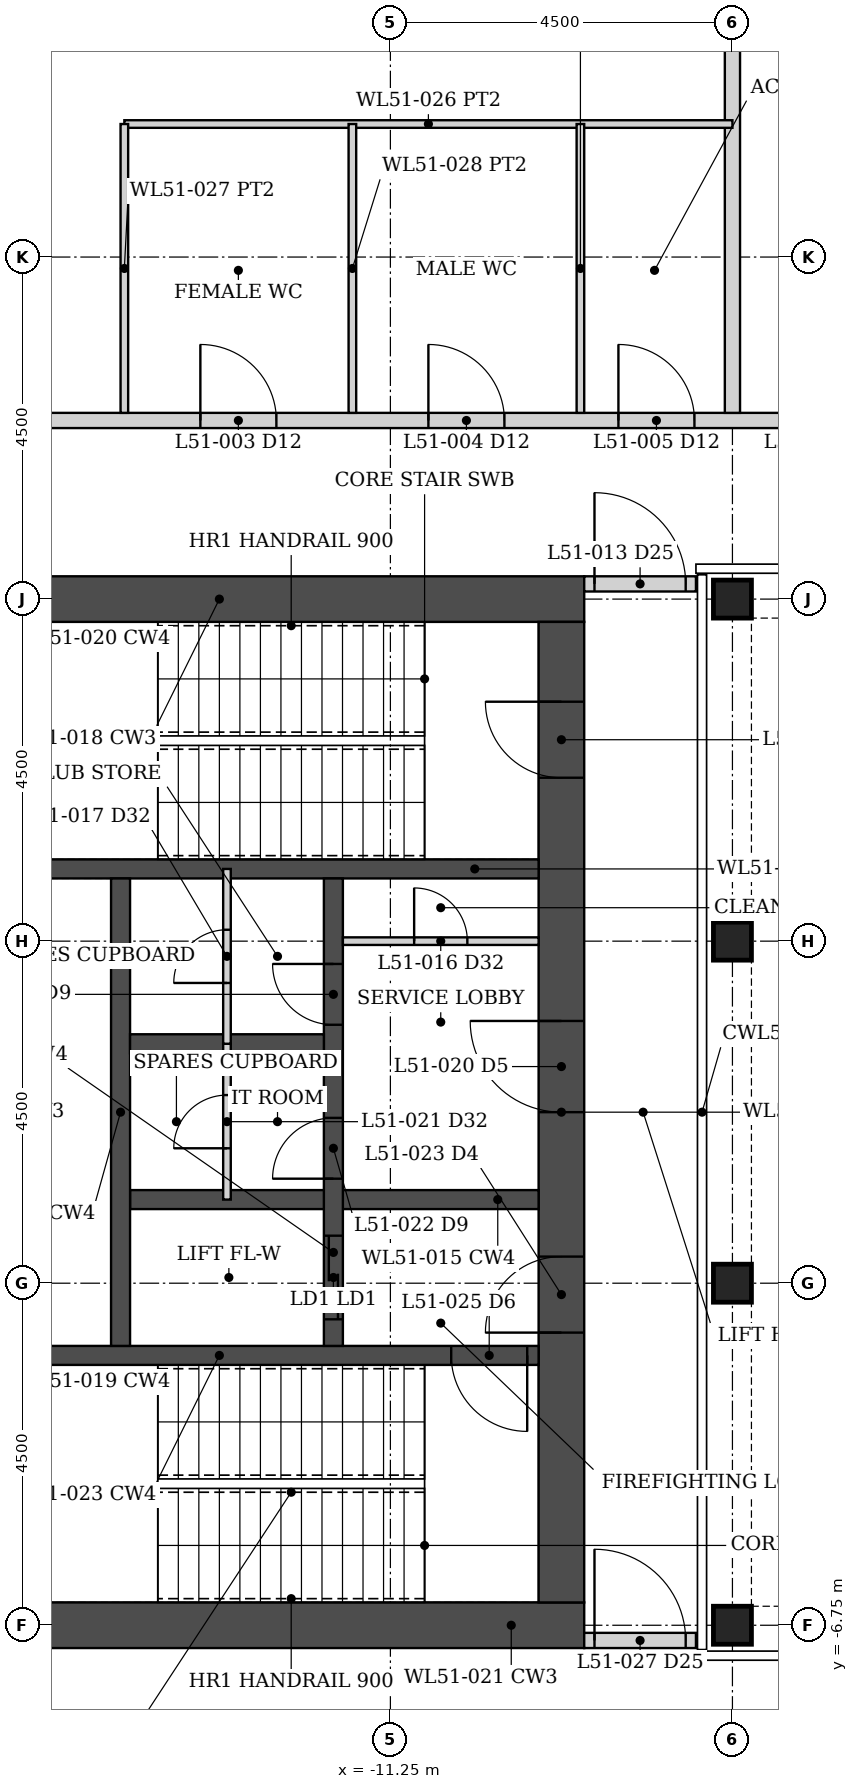
"""IFC4 building model, lengths in metres.
Left out: names, types, materials, properties, quantities, classifications, styles, units other than length and angle.
Written with IfcOpenShell. Run it as: python <this file> out.ifc"""

import sys

from ifc_helpers import new_model, si_unit, direction, frame, frame_2d, origin, origin_2d, place, context, subcontext, project, spatial, rectangle, hollow_rectangle, extrude, element, fill, save


model = new_model("IFC4")
c1 = context("Model", 3, precision=1e-05, world=origin(), true_north=direction((0.0, 1.0)))
c2 = subcontext(c1, "Body", "Model", "MODEL_VIEW")
j1 = project(units=[si_unit("LENGTHUNIT", "METRE"), si_unit("PLANEANGLEUNIT", "RADIAN")], contexts=[c1])
p1 = place(None, origin())
s1 = spatial("IfcSite", under=j1, at=p1, CompositionType="ELEMENT")
p2 = place(p1, origin())
s2 = spatial("IfcBuilding", under=s1, at=p2, CompositionType="ELEMENT")
p3 = place(p2, frame((0.0, 0.0, 195.8)))
s3 = spatial("IfcBuildingStorey", under=s2, at=p3, CompositionType="ELEMENT", Elevation=195.8)
for number, where, z_axis, x_axis in (
    (1, (-6.75, -6.75, 0.0), (0.0, 0.0, 1.0), (1.0, 0.0, 0.0)),
    (2, (-6.75, -2.25, 0.0), (0.0, 0.0, 1.0), (1.0, 0.0, 0.0)),
    (3, (-6.75, 2.25, 0.0), (0.0, 0.0, 1.0), (1.0, 0.0, 0.0)),
    (4, (-6.75, 6.75, 0.0), (0.0, 0.0, 1.0), (1.0, 0.0, 0.0)),
):
    element("IfcColumn", number, at=place(p3, frame(where, z_axis=z_axis, x_axis=x_axis)), inside=s3, PredefinedType="COLUMN", context=c2, shape_type="SweptSolid", body=[
        extrude(hollow_rectangle(XDim=0.5, YDim=0.5, WallThickness=0.03, at=origin_2d()), origin(), (0.0, 0.0, 1.0), 5.0),
    ])
for number, where, z_axis, x_axis in (
    (5, (-8.7, -6.75, 0.0), (0.0, 0.0, 1.0), (-1.0, 0.0, 0.0)),
    (6, (-8.7, 6.75, 0.0), (0.0, 0.0, 1.0), (-1.0, 0.0, 0.0)),
):
    element("IfcWall", number, at=place(p3, frame(where, z_axis=z_axis, x_axis=x_axis)), inside=s3, PredefinedType="SHEAR", context=c2, shape_type="SweptSolid", body=[
        extrude(rectangle(XDim=9.6, YDim=0.6, at=frame_2d((4.8, 0.0))), origin(), (0.0, 0.0, 1.0), 5.0),
    ])
p4 = place(p3, frame((-9.0, -6.45, 0.0), z_axis=(0.0, 0.0, 1.0), x_axis=(0.0, 1.0, 0.0)))
e7 = element("IfcWall", 7, at=p4, inside=s3, PredefinedType="SHEAR", context=c2, shape_type="SweptSolid", body=[
    extrude(rectangle(XDim=12.9, YDim=0.6, at=frame_2d((6.45, 0.0))), origin(), (0.0, 0.0, 1.0), 5.0),
])
p5 = place(p4, frame((3.55, 0.0, 0.0)))
e8 = element("IfcOpeningElement", 8, at=p5, cuts=e7, PredefinedType="OPENING", context=c2, shape_type="SweptSolid", body=[
    extrude(rectangle(XDim=1.0, YDim=2.1, at=frame_2d((0.5, 1.05))), frame((0.0, 0.31, 0.0), z_axis=(0.0, -1.0, 0.0), x_axis=(1.0, 0.0, 0.0)), (0.0, 0.0, 1.0), 0.62),
])
p6 = place(p4, frame((6.45, 0.0, 0.0)))
e9 = element("IfcOpeningElement", 9, at=p6, cuts=e7, PredefinedType="OPENING", context=c2, shape_type="SweptSolid", body=[
    extrude(rectangle(XDim=1.2, YDim=2.1, at=frame_2d((0.6, 1.05))), frame((0.0, 0.31, 0.0), z_axis=(0.0, -1.0, 0.0), x_axis=(1.0, 0.0, 0.0)), (0.0, 0.0, 1.0), 0.62),
])
p7 = place(p4, frame((10.85, 0.0, 0.0)))
e10 = element("IfcOpeningElement", 10, at=p7, cuts=e7, PredefinedType="OPENING", context=c2, shape_type="SweptSolid", body=[
    extrude(rectangle(XDim=1.0, YDim=2.1, at=frame_2d((0.5, 1.05))), frame((0.0, 0.31, 0.0), z_axis=(0.0, -1.0, 0.0), x_axis=(1.0, 0.0, 0.0)), (0.0, 0.0, 1.0), 0.62),
])
p8 = place(p3, frame((-9.3, -3.2, 0.0), z_axis=(0.0, 0.0, 1.0), x_axis=(-1.0, 0.0, 0.0)))
e11 = element("IfcWall", 11, at=p8, inside=s3, PredefinedType="SHEAR", context=c2, shape_type="SweptSolid", body=[
    extrude(rectangle(XDim=8.4, YDim=0.25, at=frame_2d((4.2, 0.0))), origin(), (0.0, 0.0, 1.0), 5.0),
])
p9 = place(p8, frame((0.15, 0.0, 0.0)))
e12 = element("IfcOpeningElement", 12, at=p9, cuts=e11, PredefinedType="OPENING", context=c2, shape_type="SweptSolid", body=[
    extrude(rectangle(XDim=1.0, YDim=2.1, at=frame_2d((0.5, 1.05))), frame((0.0, 0.135, 0.0), z_axis=(0.0, -1.0, 0.0), x_axis=(1.0, 0.0, 0.0)), (0.0, 0.0, 1.0), 0.27),
])
p10 = place(p3, frame((-9.3, 3.2, 0.0), z_axis=(0.0, 0.0, 1.0), x_axis=(-1.0, 0.0, 0.0)))
e13 = element("IfcWall", 13, at=p10, inside=s3, PredefinedType="SHEAR", context=c2, shape_type="SweptSolid", body=[
    extrude(rectangle(XDim=8.4, YDim=0.25, at=frame_2d((4.2, 0.0))), origin(), (0.0, 0.0, 1.0), 5.0),
])
p11 = place(p3, frame((-9.3, -1.15, 0.0), z_axis=(0.0, 0.0, 1.0), x_axis=(-1.0, 0.0, 0.0)))
e14 = element("IfcWall", 14, at=p11, inside=s3, PredefinedType="SHEAR", context=c2, shape_type="SweptSolid", body=[
    extrude(rectangle(XDim=5.375, YDim=0.25, at=frame_2d((2.688, 0.0))), origin(), (0.0, 0.0, 1.0), 5.0),
])
p12 = place(p3, frame((-12.0, -3.075, 0.0), z_axis=(0.0, 0.0, 1.0), x_axis=(0.0, 1.0, 0.0)))
e15 = element("IfcWall", 15, at=p12, inside=s3, PredefinedType="SHEAR", context=c2, shape_type="SweptSolid", body=[
    extrude(rectangle(XDim=6.15, YDim=0.25, at=frame_2d((3.075, 0.0))), origin(), (0.0, 0.0, 1.0), 5.0),
])
p13 = place(p12, frame((2.2, 0.0, 0.0)))
e16 = element("IfcOpeningElement", 16, at=p13, cuts=e15, PredefinedType="OPENING", context=c2, shape_type="SweptSolid", body=[
    extrude(rectangle(XDim=0.8, YDim=2.1, at=frame_2d((0.4, 1.05))), frame((0.0, 0.135, 0.0), z_axis=(0.0, -1.0, 0.0), x_axis=(1.0, 0.0, 0.0)), (0.0, 0.0, 1.0), 0.27),
])
p14 = place(p12, frame((4.225, 0.0, 0.0)))
e17 = element("IfcOpeningElement", 17, at=p14, cuts=e15, PredefinedType="OPENING", context=c2, shape_type="SweptSolid", body=[
    extrude(rectangle(XDim=0.8, YDim=2.1, at=frame_2d((0.4, 1.05))), frame((0.0, 0.135, 0.0), z_axis=(0.0, -1.0, 0.0), x_axis=(1.0, 0.0, 0.0)), (0.0, 0.0, 1.0), 0.27),
])
p15 = place(p12, frame((0.35, 0.0, 0.0)))
e18 = element("IfcOpeningElement", 18, at=p15, cuts=e15, PredefinedType="OPENING", context=c2, shape_type="SweptSolid", body=[
    extrude(rectangle(XDim=1.1, YDim=2.1, at=frame_2d((0.55, 1.05))), frame((0.0, 0.135, 0.0), z_axis=(0.0, -1.0, 0.0), x_axis=(1.0, 0.0, 0.0)), (0.0, 0.0, 1.0), 0.27),
])
p16 = place(p3, frame((-14.8, -3.075, 0.0), z_axis=(0.0, 0.0, 1.0), x_axis=(0.0, 1.0, 0.0)))
e19 = element("IfcWall", 19, at=p16, inside=s3, PredefinedType="SHEAR", context=c2, shape_type="SweptSolid", body=[
    extrude(rectangle(XDim=6.15, YDim=0.25, at=frame_2d((3.075, 0.0))), origin(), (0.0, 0.0, 1.0), 5.0),
])
p17 = place(p3, frame((-12.125, 0.9, 0.0), z_axis=(0.0, 0.0, 1.0), x_axis=(-1.0, 0.0, 0.0)))
e20 = element("IfcWall", 20, at=p17, inside=s3, PredefinedType="SHEAR", context=c2, shape_type="SweptSolid", body=[
    extrude(rectangle(XDim=2.55, YDim=0.25, at=frame_2d((1.275, 0.0))), origin(), (0.0, 0.0, 1.0), 5.0),
])
p18 = place(p3, frame((-8.7, 6.95, 0.0), z_axis=(0.0, 0.0, 1.0), x_axis=(1.0, 0.0, 0.0)))
e21 = element("IfcWall", 21, at=p18, inside=s3, PredefinedType="PARTITIONING", context=c2, shape_type="SweptSolid", body=[
    extrude(rectangle(XDim=1.47, YDim=0.2, at=frame_2d((0.735, 0.0))), origin(), (0.0, 0.0, 1.0), 3.873),
])
p19 = place(p18, frame((0.135, 0.0, 0.0)))
e22 = element("IfcOpeningElement", 22, at=p19, cuts=e21, PredefinedType="OPENING", context=c2, shape_type="SweptSolid", body=[
    extrude(rectangle(XDim=1.2, YDim=2.1, at=frame_2d((0.6, 1.05))), frame((0.0, 0.11, 0.0), z_axis=(0.0, -1.0, 0.0), x_axis=(1.0, 0.0, 0.0)), (0.0, 0.0, 1.0), 0.22),
])
p20 = place(p3, frame((-8.7, -6.95, 0.0), z_axis=(0.0, 0.0, 1.0), x_axis=(1.0, 0.0, 0.0)))
e23 = element("IfcWall", 23, at=p20, inside=s3, PredefinedType="PARTITIONING", context=c2, shape_type="SweptSolid", body=[
    extrude(rectangle(XDim=1.47, YDim=0.2, at=frame_2d((0.735, 0.0))), origin(), (0.0, 0.0, 1.0), 3.873),
])
p21 = place(p20, frame((0.135, 0.0, 0.0)))
e24 = element("IfcOpeningElement", 24, at=p21, cuts=e23, PredefinedType="OPENING", context=c2, shape_type="SweptSolid", body=[
    extrude(rectangle(XDim=1.2, YDim=2.1, at=frame_2d((0.6, 1.05))), frame((0.0, 0.11, 0.0), z_axis=(0.0, -1.0, 0.0), x_axis=(1.0, 0.0, 0.0)), (0.0, 0.0, 1.0), 0.22),
])
p22 = place(p3, frame((-20.025, 9.1, 0.0), z_axis=(0.0, 0.0, 1.0), x_axis=(1.0, 0.0, 0.0)))
e25 = element("IfcWall", 25, at=p22, inside=s3, PredefinedType="PARTITIONING", context=c2, shape_type="SweptSolid", body=[
    extrude(rectangle(XDim=40.05, YDim=0.2, at=frame_2d((20.025, 0.0))), origin(), (0.0, 0.0, 1.0), 3.873),
])
p23 = place(p22, frame((2.349, 0.0, 0.0)))
e26 = element("IfcOpeningElement", 26, at=p23, cuts=e25, PredefinedType="OPENING", context=c2, shape_type="SweptSolid", body=[
    extrude(rectangle(XDim=0.9, YDim=2.1, at=frame_2d((0.45, 1.05))), frame((0.0, 0.11, 0.0), z_axis=(0.0, -1.0, 0.0), x_axis=(1.0, 0.0, 0.0)), (0.0, 0.0, 1.0), 0.22),
])
p24 = place(p22, frame((6.275, 0.0, 0.0)))
e27 = element("IfcOpeningElement", 27, at=p24, cuts=e25, PredefinedType="OPENING", context=c2, shape_type="SweptSolid", body=[
    extrude(rectangle(XDim=1.0, YDim=2.1, at=frame_2d((0.5, 1.05))), frame((0.0, 0.11, 0.0), z_axis=(0.0, -1.0, 0.0), x_axis=(1.0, 0.0, 0.0)), (0.0, 0.0, 1.0), 0.22),
])
p25 = place(p22, frame((9.275, 0.0, 0.0)))
e28 = element("IfcOpeningElement", 28, at=p25, cuts=e25, PredefinedType="OPENING", context=c2, shape_type="SweptSolid", body=[
    extrude(rectangle(XDim=1.0, YDim=2.1, at=frame_2d((0.5, 1.05))), frame((0.0, 0.11, 0.0), z_axis=(0.0, -1.0, 0.0), x_axis=(1.0, 0.0, 0.0)), (0.0, 0.0, 1.0), 0.22),
])
p26 = place(p22, frame((11.775, 0.0, 0.0)))
e29 = element("IfcOpeningElement", 29, at=p26, cuts=e25, PredefinedType="OPENING", context=c2, shape_type="SweptSolid", body=[
    extrude(rectangle(XDim=1.0, YDim=2.1, at=frame_2d((0.5, 1.05))), frame((0.0, 0.11, 0.0), z_axis=(0.0, -1.0, 0.0), x_axis=(1.0, 0.0, 0.0)), (0.0, 0.0, 1.0), 0.22),
])
p27 = place(p22, frame((13.989, 0.0, 0.0)))
e30 = element("IfcOpeningElement", 30, at=p27, cuts=e25, PredefinedType="OPENING", context=c2, shape_type="SweptSolid", body=[
    extrude(rectangle(XDim=0.9, YDim=2.1, at=frame_2d((0.45, 1.05))), frame((0.0, 0.11, 0.0), z_axis=(0.0, -1.0, 0.0), x_axis=(1.0, 0.0, 0.0)), (0.0, 0.0, 1.0), 0.22),
])
p28 = place(p22, frame((16.25, 0.0, 0.0)))
e31 = element("IfcOpeningElement", 31, at=p28, cuts=e25, PredefinedType="OPENING", context=c2, shape_type="SweptSolid", body=[
    extrude(rectangle(XDim=0.8, YDim=2.1, at=frame_2d((0.4, 1.05))), frame((0.0, 0.11, 0.0), z_axis=(0.0, -1.0, 0.0), x_axis=(1.0, 0.0, 0.0)), (0.0, 0.0, 1.0), 0.22),
])
p29 = place(p22, frame((25.169, 0.0, 0.0)))
e32 = element("IfcOpeningElement", 32, at=p29, cuts=e25, PredefinedType="OPENING", context=c2, shape_type="SweptSolid", body=[
    extrude(rectangle(XDim=0.9, YDim=2.1, at=frame_2d((0.45, 1.05))), frame((0.0, 0.11, 0.0), z_axis=(0.0, -1.0, 0.0), x_axis=(1.0, 0.0, 0.0)), (0.0, 0.0, 1.0), 0.22),
])
p30 = place(p22, frame((20.55, 0.0, 0.0)))
e33 = element("IfcOpeningElement", 33, at=p30, cuts=e25, PredefinedType="OPENING", context=c2, shape_type="SweptSolid", body=[
    extrude(rectangle(XDim=1.2, YDim=2.1, at=frame_2d((0.6, 1.05))), frame((0.0, 0.11, 0.0), z_axis=(0.0, -1.0, 0.0), x_axis=(1.0, 0.0, 0.0)), (0.0, 0.0, 1.0), 0.22),
])
p31 = place(p22, frame((35.677, 0.0, 0.0)))
e34 = element("IfcOpeningElement", 34, at=p31, cuts=e25, PredefinedType="OPENING", context=c2, shape_type="SweptSolid", body=[
    extrude(rectangle(XDim=0.9, YDim=2.1, at=frame_2d((0.45, 1.05))), frame((0.0, 0.11, 0.0), z_axis=(0.0, -1.0, 0.0), x_axis=(1.0, 0.0, 0.0)), (0.0, 0.0, 1.0), 0.22),
])
p32 = place(p22, frame((27.65, 0.0, 0.0)))
e35 = element("IfcOpeningElement", 35, at=p32, cuts=e25, PredefinedType="OPENING", context=c2, shape_type="SweptSolid", body=[
    extrude(rectangle(XDim=1.0, YDim=2.1, at=frame_2d((0.5, 1.05))), frame((0.0, 0.11, 0.0), z_axis=(0.0, -1.0, 0.0), x_axis=(1.0, 0.0, 0.0)), (0.0, 0.0, 1.0), 0.22),
])
p33 = place(p22, frame((30.525, 0.0, 0.0)))
e36 = element("IfcOpeningElement", 36, at=p33, cuts=e25, PredefinedType="OPENING", context=c2, shape_type="SweptSolid", body=[
    extrude(rectangle(XDim=1.0, YDim=2.1, at=frame_2d((0.5, 1.05))), frame((0.0, 0.11, 0.0), z_axis=(0.0, -1.0, 0.0), x_axis=(1.0, 0.0, 0.0)), (0.0, 0.0, 1.0), 0.22),
])
p34 = place(p3, frame((-6.75, 9.2, 0.0), z_axis=(0.0, 0.0, 1.0), x_axis=(0.0, 1.0, 0.0)))
e37 = element("IfcWall", 37, at=p34, inside=s3, PredefinedType="PARTITIONING", context=c2, shape_type="SweptSolid", body=[
    extrude(rectangle(XDim=10.7, YDim=0.2, at=frame_2d((5.35, 0.0))), origin(), (0.0, 0.0, 1.0), 3.873),
])
p35 = place(p3, frame((-14.75, 13.0, 0.0), z_axis=(0.0, 0.0, 1.0), x_axis=(1.0, 0.0, 0.0)))
e38 = element("IfcWall", 38, at=p35, inside=s3, PredefinedType="PARTITIONING", context=c2, shape_type="SweptSolid", body=[
    extrude(rectangle(XDim=8.0, YDim=0.1, at=frame_2d((4.0, 0.0))), origin(), (0.0, 0.0, 1.0), 3.873),
])
for number, where, z_axis, x_axis in (
    (39, (-14.75, 9.2, 0.0), (0.0, 0.0, 1.0), (0.0, 1.0, 0.0)),
    (40, (-11.75, 9.2, 0.0), (0.0, 0.0, 1.0), (0.0, 1.0, 0.0)),
    (41, (-8.75, 9.2, 0.0), (0.0, 0.0, 1.0), (0.0, 1.0, 0.0)),
):
    element("IfcWall", number, at=place(p3, frame(where, z_axis=z_axis, x_axis=x_axis)), inside=s3, PredefinedType="PARTITIONING", context=c2, shape_type="SweptSolid", body=[
        extrude(rectangle(XDim=3.8, YDim=0.1, at=frame_2d((1.9, 0.0))), origin(), (0.0, 0.0, 1.0), 3.873),
    ])
p36 = place(p3, frame((-11.875, 2.25, 0.0), z_axis=(0.0, 0.0, 1.0), x_axis=(1.0, 0.0, 0.0)))
e42 = element("IfcWall", 42, at=p36, inside=s3, PredefinedType="PARTITIONING", context=c2, shape_type="SweptSolid", body=[
    extrude(rectangle(XDim=2.575, YDim=0.1, at=frame_2d((1.288, 0.0))), origin(), (0.0, 0.0, 1.0), 3.873),
])
p37 = place(p36, frame((0.938, 0.0, 0.0)))
e43 = element("IfcOpeningElement", 43, at=p37, cuts=e42, PredefinedType="OPENING", context=c2, shape_type="SweptSolid", body=[
    extrude(rectangle(XDim=0.7, YDim=2.1, at=frame_2d((0.35, 1.05))), frame((0.0, 0.06, 0.0), z_axis=(0.0, -1.0, 0.0), x_axis=(1.0, 0.0, 0.0)), (0.0, 0.0, 1.0), 0.12),
])
p38 = place(p3, frame((-13.4, -1.15, 0.0), z_axis=(0.0, 0.0, 1.0), x_axis=(0.0, 1.0, 0.0)))
e44 = element("IfcWall", 44, at=p38, inside=s3, PredefinedType="PARTITIONING", context=c2, shape_type="SweptSolid", body=[
    extrude(rectangle(XDim=2.05, YDim=0.1, at=frame_2d((1.025, 0.0))), origin(), (0.0, 0.0, 1.0), 3.873),
])
p39 = place(p38, frame((0.675, 0.0, 0.0)))
e45 = element("IfcOpeningElement", 45, at=p39, cuts=e44, PredefinedType="OPENING", context=c2, shape_type="SweptSolid", body=[
    extrude(rectangle(XDim=0.7, YDim=2.1, at=frame_2d((0.35, 1.05))), frame((0.0, 0.06, 0.0), z_axis=(0.0, -1.0, 0.0), x_axis=(1.0, 0.0, 0.0)), (0.0, 0.0, 1.0), 0.12),
])
p40 = place(p3, frame((-13.4, 0.9, 0.0), z_axis=(0.0, 0.0, 1.0), x_axis=(0.0, 1.0, 0.0)))
e46 = element("IfcWall", 46, at=p40, inside=s3, PredefinedType="PARTITIONING", context=c2, shape_type="SweptSolid", body=[
    extrude(rectangle(XDim=2.3, YDim=0.1, at=frame_2d((1.15, 0.0))), origin(), (0.0, 0.0, 1.0), 3.873),
])
p41 = place(p40, frame((0.8, 0.0, 0.0)))
e47 = element("IfcOpeningElement", 47, at=p41, cuts=e46, PredefinedType="OPENING", context=c2, shape_type="SweptSolid", body=[
    extrude(rectangle(XDim=0.7, YDim=2.1, at=frame_2d((0.35, 1.05))), frame((0.0, 0.06, 0.0), z_axis=(0.0, -1.0, 0.0), x_axis=(1.0, 0.0, 0.0)), (0.0, 0.0, 1.0), 0.12),
])
p42 = place(p19, origin())
e48 = element("IfcDoor", 48, at=p42, inside=s3, OperationType="DOUBLE_DOOR_DOUBLE_SWING", PredefinedType="DOOR", context=c2, shape_type="SweptSolid", body=[
    extrude(rectangle(XDim=1.2, YDim=2.1, at=frame_2d((0.6, 1.05))), frame((0.0, 0.025, 0.0), z_axis=(0.0, -1.0, 0.0), x_axis=(1.0, 0.0, 0.0)), (0.0, 0.0, 1.0), 0.05),
])
fill(e22, e48)
p43 = place(p21, origin())
e49 = element("IfcDoor", 49, at=p43, inside=s3, OperationType="DOUBLE_DOOR_DOUBLE_SWING", PredefinedType="DOOR", context=c2, shape_type="SweptSolid", body=[
    extrude(rectangle(XDim=1.2, YDim=2.1, at=frame_2d((0.6, 1.05))), frame((0.0, 0.025, 0.0), z_axis=(0.0, -1.0, 0.0), x_axis=(1.0, 0.0, 0.0)), (0.0, 0.0, 1.0), 0.05),
])
fill(e24, e49)
p44 = place(p24, origin())
e50 = element("IfcDoor", 50, at=p44, inside=s3, OperationType="SINGLE_SWING_LEFT", PredefinedType="DOOR", context=c2, shape_type="SweptSolid", body=[
    extrude(rectangle(XDim=1.0, YDim=2.1, at=frame_2d((0.5, 1.05))), frame((0.0, 0.025, 0.0), z_axis=(0.0, -1.0, 0.0), x_axis=(1.0, 0.0, 0.0)), (0.0, 0.0, 1.0), 0.05),
])
fill(e27, e50)
p45 = place(p25, origin())
e51 = element("IfcDoor", 51, at=p45, inside=s3, OperationType="SINGLE_SWING_LEFT", PredefinedType="DOOR", context=c2, shape_type="SweptSolid", body=[
    extrude(rectangle(XDim=1.0, YDim=2.1, at=frame_2d((0.5, 1.05))), frame((0.0, 0.025, 0.0), z_axis=(0.0, -1.0, 0.0), x_axis=(1.0, 0.0, 0.0)), (0.0, 0.0, 1.0), 0.05),
])
fill(e28, e51)
p46 = place(p26, origin())
e52 = element("IfcDoor", 52, at=p46, inside=s3, OperationType="SINGLE_SWING_LEFT", PredefinedType="DOOR", context=c2, shape_type="SweptSolid", body=[
    extrude(rectangle(XDim=1.0, YDim=2.1, at=frame_2d((0.5, 1.05))), frame((0.0, 0.025, 0.0), z_axis=(0.0, -1.0, 0.0), x_axis=(1.0, 0.0, 0.0)), (0.0, 0.0, 1.0), 0.05),
])
fill(e29, e52)
p47 = place(p5, origin())
e53 = element("IfcDoor", 53, at=p47, inside=s3, OperationType="SINGLE_SWING_LEFT", PredefinedType="DOOR", context=c2, shape_type="SweptSolid", body=[
    extrude(rectangle(XDim=1.0, YDim=2.1, at=frame_2d((0.5, 1.05))), frame((0.0, 0.025, 0.0), z_axis=(0.0, -1.0, 0.0), x_axis=(1.0, 0.0, 0.0)), (0.0, 0.0, 1.0), 0.05),
])
fill(e8, e53)
p48 = place(p9, origin())
e54 = element("IfcDoor", 54, at=p48, inside=s3, OperationType="SINGLE_SWING_LEFT", PredefinedType="DOOR", context=c2, shape_type="SweptSolid", body=[
    extrude(rectangle(XDim=1.0, YDim=2.1, at=frame_2d((0.5, 1.05))), frame((0.0, 0.025, 0.0), z_axis=(0.0, -1.0, 0.0), x_axis=(1.0, 0.0, 0.0)), (0.0, 0.0, 1.0), 0.05),
])
fill(e12, e54)
p49 = place(p37, origin())
e55 = element("IfcDoor", 55, at=p49, inside=s3, OperationType="SINGLE_SWING_LEFT", PredefinedType="DOOR", context=c2, shape_type="SweptSolid", body=[
    extrude(rectangle(XDim=0.7, YDim=2.1, at=frame_2d((0.35, 1.05))), frame((0.0, 0.025, 0.0), z_axis=(0.0, -1.0, 0.0), x_axis=(1.0, 0.0, 0.0)), (0.0, 0.0, 1.0), 0.05),
])
fill(e43, e55)
p50 = place(p6, origin())
e56 = element("IfcDoor", 56, at=p50, inside=s3, OperationType="SINGLE_SWING_RIGHT", PredefinedType="DOOR", context=c2, shape_type="SweptSolid", body=[
    extrude(rectangle(XDim=1.2, YDim=2.1, at=frame_2d((0.6, 1.05))), frame((0.0, 0.025, 0.0), z_axis=(0.0, -1.0, 0.0), x_axis=(1.0, 0.0, 0.0)), (0.0, 0.0, 1.0), 0.05),
])
fill(e9, e56)
p51 = place(p39, origin())
e57 = element("IfcDoor", 57, at=p51, inside=s3, OperationType="SINGLE_SWING_LEFT", PredefinedType="DOOR", context=c2, shape_type="SweptSolid", body=[
    extrude(rectangle(XDim=0.7, YDim=2.1, at=frame_2d((0.35, 1.05))), frame((0.0, 0.025, 0.0), z_axis=(0.0, -1.0, 0.0), x_axis=(1.0, 0.0, 0.0)), (0.0, 0.0, 1.0), 0.05),
])
fill(e45, e57)
p52 = place(p13, origin())
e58 = element("IfcDoor", 58, at=p52, inside=s3, OperationType="SINGLE_SWING_LEFT", PredefinedType="DOOR", context=c2, shape_type="SweptSolid", body=[
    extrude(rectangle(XDim=0.8, YDim=2.1, at=frame_2d((0.4, 1.05))), frame((0.0, 0.025, 0.0), z_axis=(0.0, -1.0, 0.0), x_axis=(1.0, 0.0, 0.0)), (0.0, 0.0, 1.0), 0.05),
])
fill(e16, e58)
p53 = place(p41, origin())
e59 = element("IfcDoor", 59, at=p53, inside=s3, OperationType="SINGLE_SWING_LEFT", PredefinedType="DOOR", context=c2, shape_type="SweptSolid", body=[
    extrude(rectangle(XDim=0.7, YDim=2.1, at=frame_2d((0.35, 1.05))), frame((0.0, 0.025, 0.0), z_axis=(0.0, -1.0, 0.0), x_axis=(1.0, 0.0, 0.0)), (0.0, 0.0, 1.0), 0.05),
])
fill(e47, e59)
p54 = place(p14, origin())
e60 = element("IfcDoor", 60, at=p54, inside=s3, OperationType="SINGLE_SWING_RIGHT", PredefinedType="DOOR", context=c2, shape_type="SweptSolid", body=[
    extrude(rectangle(XDim=0.8, YDim=2.1, at=frame_2d((0.4, 1.05))), frame((0.0, 0.025, 0.0), z_axis=(0.0, -1.0, 0.0), x_axis=(1.0, 0.0, 0.0)), (0.0, 0.0, 1.0), 0.05),
])
fill(e17, e60)
p55 = place(p7, origin())
e61 = element("IfcDoor", 61, at=p55, inside=s3, OperationType="SINGLE_SWING_RIGHT", PredefinedType="DOOR", context=c2, shape_type="SweptSolid", body=[
    extrude(rectangle(XDim=1.0, YDim=2.1, at=frame_2d((0.5, 1.05))), frame((0.0, 0.025, 0.0), z_axis=(0.0, -1.0, 0.0), x_axis=(1.0, 0.0, 0.0)), (0.0, 0.0, 1.0), 0.05),
])
fill(e10, e61)
p56 = place(p15, origin())
e62 = element("IfcDoor", 62, at=p56, inside=s3, OperationType="DOUBLE_DOOR_SLIDING", PredefinedType="DOOR", context=c2, shape_type="SweptSolid", body=[
    extrude(rectangle(XDim=1.1, YDim=2.1, at=frame_2d((0.55, 1.05))), frame((0.0, 0.025, 0.0), z_axis=(0.0, -1.0, 0.0), x_axis=(1.0, 0.0, 0.0)), (0.0, 0.0, 1.0), 0.05),
])
fill(e18, e62)
save(model, sys.argv[1])
